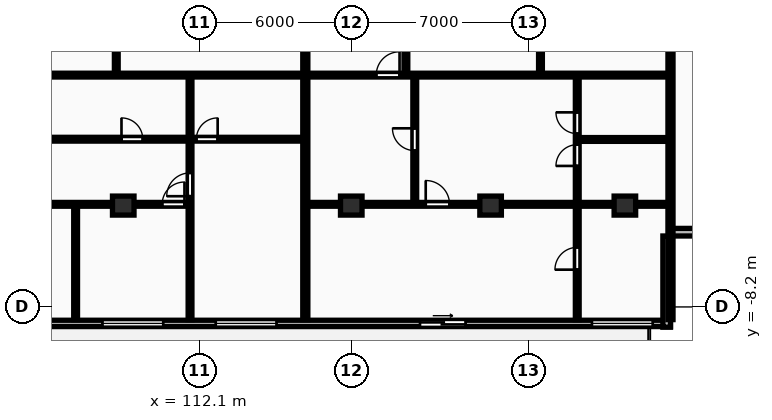
"""IFC4 building model, lengths in metres.
Left out: names, types, materials, properties, quantities, classifications, styles, units other than length and angle.
Written with IfcOpenShell. Run it as: python <this file> out.ifc"""

import sys

from ifc_helpers import new_model, si_unit, direction, frame, frame_2d, origin, origin_2d, place, context, subcontext, project, spatial, rectangle, extrude, element, fill, save


model = new_model("IFC4")
c1 = context("Model", 3, precision=1e-05, world=origin(), true_north=direction((0.0, 1.0)))
c2 = subcontext(c1, "Body", "Model", "MODEL_VIEW")
j1 = project(units=[si_unit("LENGTHUNIT", "METRE"), si_unit("PLANEANGLEUNIT", "RADIAN")], contexts=[c1])
p1 = place(None, origin())
s1 = spatial("IfcSite", under=j1, at=p1, CompositionType="ELEMENT")
p2 = place(p1, origin())
s2 = spatial("IfcBuilding", under=s1, at=p2, CompositionType="ELEMENT")
p3 = place(p2, frame((0.0, 0.0, 132.8)))
s3 = spatial("IfcBuildingStorey", under=s2, at=p3, CompositionType="ELEMENT", Elevation=132.8)
for number, where, z_axis, x_axis in (
    (1, (109.1, -4.2, 0.0), (0.0, 0.0, 1.0), (1.0, 0.0, 0.0)),
    (2, (118.1, -4.2, 0.0), (0.0, 0.0, 1.0), (1.0, 0.0, 0.0)),
    (3, (123.6, -4.2, 0.0), (0.0, 0.0, 1.0), (1.0, 0.0, 0.0)),
    (4, (128.9, -4.2, 0.0), (0.0, 0.0, 1.0), (1.0, 0.0, 0.0)),
):
    element("IfcColumn", number, at=place(p3, frame(where, z_axis=z_axis, x_axis=x_axis)), inside=s3, PredefinedType="COLUMN", context=c2, shape_type="SweptSolid", body=[
        extrude(rectangle(XDim=0.85, YDim=0.75, at=origin_2d()), origin(), (0.0, 0.0, 1.0), 3.25),
    ])
p4 = place(p3, frame((72.7, -8.85, 0.0), z_axis=(0.0, 0.0, 1.0), x_axis=(1.0, 0.0, 0.0)))
e5 = element("IfcWall", 5, at=p4, inside=s3, PredefinedType="STANDARD", context=c2, shape_type="SweptSolid", body=[
    extrude(rectangle(XDim=58.0, YDim=0.25, at=frame_2d((29.0, 0.0))), origin(), (0.0, 0.0, 1.0), 2.97),
])
p5 = place(p4, frame((6.19, 0.0, 0.85)))
e6 = element("IfcOpeningElement", 6, at=p5, cuts=e5, PredefinedType="OPENING", context=c2, shape_type="SweptSolid", body=[
    extrude(rectangle(XDim=2.4, YDim=1.9, at=frame_2d((1.2, 0.95))), frame((0.0, 0.135, 0.0), z_axis=(0.0, -1.0, 0.0), x_axis=(1.0, 0.0, 0.0)), (0.0, 0.0, 1.0), 0.27),
])
p6 = place(p4, frame((11.39, 0.0, 0.85)))
e7 = element("IfcOpeningElement", 7, at=p6, cuts=e5, PredefinedType="OPENING", context=c2, shape_type="SweptSolid", body=[
    extrude(rectangle(XDim=2.4, YDim=1.9, at=frame_2d((1.2, 0.95))), frame((0.0, 0.135, 0.0), z_axis=(0.0, -1.0, 0.0), x_axis=(1.0, 0.0, 0.0)), (0.0, 0.0, 1.0), 0.27),
])
p7 = place(p4, frame((16.535, 0.0, 0.85)))
e8 = element("IfcOpeningElement", 8, at=p7, cuts=e5, PredefinedType="OPENING", context=c2, shape_type="SweptSolid", body=[
    extrude(rectangle(XDim=2.4, YDim=1.9, at=frame_2d((1.2, 0.95))), frame((0.0, 0.135, 0.0), z_axis=(0.0, -1.0, 0.0), x_axis=(1.0, 0.0, 0.0)), (0.0, 0.0, 1.0), 0.27),
])
p8 = place(p4, frame((1.555, 0.0, 0.0)))
e9 = element("IfcOpeningElement", 9, at=p8, cuts=e5, PredefinedType="OPENING", context=c2, shape_type="SweptSolid", body=[
    extrude(rectangle(XDim=1.8, YDim=2.2, at=frame_2d((0.9, 1.1))), frame((0.0, 0.135, 0.0), z_axis=(0.0, -1.0, 0.0), x_axis=(1.0, 0.0, 0.0)), (0.0, 0.0, 1.0), 0.27),
])
p9 = place(p4, frame((21.357, 0.0, 0.85)))
e10 = element("IfcOpeningElement", 10, at=p9, cuts=e5, PredefinedType="OPENING", context=c2, shape_type="SweptSolid", body=[
    extrude(rectangle(XDim=2.4, YDim=1.9, at=frame_2d((1.2, 0.95))), frame((0.0, 0.135, 0.0), z_axis=(0.0, -1.0, 0.0), x_axis=(1.0, 0.0, 0.0)), (0.0, 0.0, 1.0), 0.27),
])
p10 = place(p4, frame((31.037, 0.0, 0.85)))
e11 = element("IfcOpeningElement", 11, at=p10, cuts=e5, PredefinedType="OPENING", context=c2, shape_type="SweptSolid", body=[
    extrude(rectangle(XDim=2.4, YDim=1.9, at=frame_2d((1.2, 0.95))), frame((0.0, 0.135, 0.0), z_axis=(0.0, -1.0, 0.0), x_axis=(1.0, 0.0, 0.0)), (0.0, 0.0, 1.0), 0.27),
])
p11 = place(p4, frame((35.578, 0.0, 0.85)))
e12 = element("IfcOpeningElement", 12, at=p11, cuts=e5, PredefinedType="OPENING", context=c2, shape_type="SweptSolid", body=[
    extrude(rectangle(XDim=2.4, YDim=1.9, at=frame_2d((1.2, 0.95))), frame((0.0, 0.135, 0.0), z_axis=(0.0, -1.0, 0.0), x_axis=(1.0, 0.0, 0.0)), (0.0, 0.0, 1.0), 0.27),
])
p12 = place(p4, frame((26.615, 0.0, 0.0)))
e13 = element("IfcOpeningElement", 13, at=p12, cuts=e5, PredefinedType="OPENING", context=c2, shape_type="SweptSolid", body=[
    extrude(rectangle(XDim=1.8, YDim=2.2, at=frame_2d((0.9, 1.1))), frame((0.0, 0.135, 0.0), z_axis=(0.0, -1.0, 0.0), x_axis=(1.0, 0.0, 0.0)), (0.0, 0.0, 1.0), 0.27),
])
p13 = place(p4, frame((40.051, 0.0, 0.85)))
e14 = element("IfcOpeningElement", 14, at=p13, cuts=e5, PredefinedType="OPENING", context=c2, shape_type="SweptSolid", body=[
    extrude(rectangle(XDim=2.4, YDim=1.9, at=frame_2d((1.2, 0.95))), frame((0.0, 0.135, 0.0), z_axis=(0.0, -1.0, 0.0), x_axis=(1.0, 0.0, 0.0)), (0.0, 0.0, 1.0), 0.27),
])
p14 = place(p4, frame((48.113, 0.0, 0.0)))
e15 = element("IfcOpeningElement", 15, at=p14, cuts=e5, PredefinedType="OPENING", context=c2, shape_type="SweptSolid", body=[
    extrude(rectangle(XDim=1.8, YDim=2.2, at=frame_2d((0.9, 1.1))), frame((0.0, 0.135, 0.0), z_axis=(0.0, -1.0, 0.0), x_axis=(1.0, 0.0, 0.0)), (0.0, 0.0, 1.0), 0.27),
])
p15 = place(p4, frame((54.9, 0.0, 0.85)))
e16 = element("IfcOpeningElement", 16, at=p15, cuts=e5, PredefinedType="OPENING", context=c2, shape_type="SweptSolid", body=[
    extrude(rectangle(XDim=2.4, YDim=1.9, at=frame_2d((1.2, 0.95))), frame((0.0, 0.135, 0.0), z_axis=(0.0, -1.0, 0.0), x_axis=(1.0, 0.0, 0.0)), (0.0, 0.0, 1.0), 0.27),
])
for number, where, z_axis, x_axis in (
    (17, (130.55, -9.0, 0.0), (0.0, 0.0, 1.0), (0.0, 1.0, 0.0)),
    (18, (130.7, -5.25, 0.0), (0.0, 0.0, 1.0), (1.0, 0.0, 0.0)),
):
    element("IfcWall", number, at=place(p3, frame(where, z_axis=z_axis, x_axis=x_axis)), inside=s3, PredefinedType="STANDARD", context=c2, shape_type="SweptSolid", body=[
        extrude(rectangle(XDim=3.6, YDim=0.3, at=frame_2d((1.8, 0.0))), origin(), (0.0, 0.0, 1.0), 2.97),
    ])
for number, where, z_axis, x_axis in (
    (19, (130.7, -8.7, 0.0), (0.0, 0.0, 1.0), (0.0, 1.0, 0.0)),
    (20, (116.286, -8.7, 0.0), (0.0, 0.0, 1.0), (0.0, 1.0, 0.0)),
):
    element("IfcWall", number, at=place(p3, frame(where, z_axis=z_axis, x_axis=x_axis)), inside=s3, PredefinedType="PARTITIONING", context=c2, shape_type="SweptSolid", body=[
        extrude(rectangle(XDim=24.57, YDim=0.2, at=frame_2d((12.285, 0.0))), origin(), (0.0, 0.0, 1.0), 2.97),
    ])
p16 = place(p3, frame((108.825, 0.99, 0.0), z_axis=(0.0, 0.0, 1.0), x_axis=(0.0, 1.0, 0.0)))
e21 = element("IfcWall", 21, at=p16, inside=s3, PredefinedType="PARTITIONING", context=c2, shape_type="SweptSolid", body=[
    extrude(rectangle(XDim=14.9, YDim=0.15, at=frame_2d((7.45, 0.0))), origin(), (0.0, 0.0, 1.0), 2.97),
])
p17 = place(p16, frame((3.321, 0.0, 0.0)))
e22 = element("IfcOpeningElement", 22, at=p17, cuts=e21, PredefinedType="OPENING", context=c2, shape_type="SweptSolid", body=[
    extrude(rectangle(XDim=0.84, YDim=2.04, at=frame_2d((0.42, 1.02))), frame((0.0, 0.085, 0.0), z_axis=(0.0, -1.0, 0.0), x_axis=(1.0, 0.0, 0.0)), (0.0, 0.0, 1.0), 0.17),
])
p18 = place(p16, frame((7.88, 0.0, 0.0)))
e23 = element("IfcOpeningElement", 23, at=p18, cuts=e21, PredefinedType="OPENING", context=c2, shape_type="SweptSolid", body=[
    extrude(rectangle(XDim=0.88, YDim=2.06, at=frame_2d((0.44, 1.03))), frame((0.0, 0.085, 0.0), z_axis=(0.0, -1.0, 0.0), x_axis=(1.0, 0.0, 0.0)), (0.0, 0.0, 1.0), 0.17),
])
p19 = place(p3, frame((107.22, -8.7, 0.0), z_axis=(0.0, 0.0, 1.0), x_axis=(0.0, 1.0, 0.0)))
e24 = element("IfcWall", 24, at=p19, inside=s3, PredefinedType="PARTITIONING", context=c2, shape_type="SweptSolid", body=[
    extrude(rectangle(XDim=4.47, YDim=0.15, at=frame_2d((2.235, 0.0))), origin(), (0.0, 0.0, 1.0), 2.97),
])
p20 = place(p3, frame((111.736, -1.56, 0.0), z_axis=(0.0, 0.0, 1.0), x_axis=(0.0, 1.0, 0.0)))
e25 = element("IfcWall", 25, at=p20, inside=s3, PredefinedType="PARTITIONING", context=c2, shape_type="SweptSolid", body=[
    extrude(rectangle(XDim=2.47, YDim=0.15, at=frame_2d((1.235, 0.0))), origin(), (0.0, 0.0, 1.0), 2.97),
])
p21 = place(p3, frame((111.736, -8.7, 0.0), z_axis=(0.0, 0.0, 1.0), x_axis=(0.0, 1.0, 0.0)))
e26 = element("IfcWall", 26, at=p21, inside=s3, PredefinedType="PARTITIONING", context=c2, shape_type="SweptSolid", body=[
    extrude(rectangle(XDim=7.1, YDim=0.15, at=frame_2d((3.55, 0.0))), origin(), (0.0, 0.0, 1.0), 2.97),
])
p22 = place(p21, frame((4.87, 0.0, 0.0)))
e27 = element("IfcOpeningElement", 27, at=p22, cuts=e26, PredefinedType="OPENING", context=c2, shape_type="SweptSolid", body=[
    extrude(rectangle(XDim=0.92, YDim=2.08, at=frame_2d((0.46, 1.04))), frame((0.0, 0.085, 0.0), z_axis=(0.0, -1.0, 0.0), x_axis=(1.0, 0.0, 0.0)), (0.0, 0.0, 1.0), 0.17),
])
p23 = place(p3, frame((102.695, -1.58, 0.0), z_axis=(0.0, 0.0, 1.0), x_axis=(1.0, 0.0, 0.0)))
e28 = element("IfcWall", 28, at=p23, inside=s3, PredefinedType="PARTITIONING", context=c2, shape_type="SweptSolid", body=[
    extrude(rectangle(XDim=13.512, YDim=0.15, at=frame_2d((6.756, 0.0))), origin(), (0.0, 0.0, 1.0), 2.97),
])
p24 = place(p23, frame((1.034, 0.0, 0.0)))
e29 = element("IfcOpeningElement", 29, at=p24, cuts=e28, PredefinedType="OPENING", context=c2, shape_type="SweptSolid", body=[
    extrude(rectangle(XDim=0.84, YDim=2.04, at=frame_2d((0.42, 1.02))), frame((0.0, 0.085, 0.0), z_axis=(0.0, -1.0, 0.0), x_axis=(1.0, 0.0, 0.0)), (0.0, 0.0, 1.0), 0.17),
])
p25 = place(p23, frame((6.336, 0.0, 0.0)))
e30 = element("IfcOpeningElement", 30, at=p25, cuts=e28, PredefinedType="OPENING", context=c2, shape_type="SweptSolid", body=[
    extrude(rectangle(XDim=0.84, YDim=2.04, at=frame_2d((0.42, 1.02))), frame((0.0, 0.085, 0.0), z_axis=(0.0, -1.0, 0.0), x_axis=(1.0, 0.0, 0.0)), (0.0, 0.0, 1.0), 0.17),
])
p26 = place(p23, frame((9.292, 0.0, 0.0)))
e31 = element("IfcOpeningElement", 31, at=p26, cuts=e28, PredefinedType="OPENING", context=c2, shape_type="SweptSolid", body=[
    extrude(rectangle(XDim=0.84, YDim=2.04, at=frame_2d((0.42, 1.02))), frame((0.0, 0.085, 0.0), z_axis=(0.0, -1.0, 0.0), x_axis=(1.0, 0.0, 0.0)), (0.0, 0.0, 1.0), 0.17),
])
p27 = place(p3, frame((97.735, 0.95, 0.0), z_axis=(0.0, 0.0, 1.0), x_axis=(1.0, 0.0, 0.0)))
e32 = element("IfcWall", 32, at=p27, inside=s3, PredefinedType="PARTITIONING", context=c2, shape_type="SweptSolid", body=[
    extrude(rectangle(XDim=18.472, YDim=0.15, at=frame_2d((9.236, 0.0))), origin(), (0.0, 0.0, 1.0), 2.97),
])
p28 = place(p27, frame((2.72, 0.0, 0.0)))
e33 = element("IfcOpeningElement", 33, at=p28, cuts=e32, PredefinedType="OPENING", context=c2, shape_type="SweptSolid", body=[
    extrude(rectangle(XDim=0.92, YDim=2.08, at=frame_2d((0.46, 1.04))), frame((0.0, 0.085, 0.0), z_axis=(0.0, -1.0, 0.0), x_axis=(1.0, 0.0, 0.0)), (0.0, 0.0, 1.0), 0.17),
])
p29 = place(p3, frame((97.735, -4.15, 0.0), z_axis=(0.0, 0.0, 1.0), x_axis=(1.0, 0.0, 0.0)))
e34 = element("IfcWall", 34, at=p29, inside=s3, PredefinedType="PARTITIONING", context=c2, shape_type="SweptSolid", body=[
    extrude(rectangle(XDim=14.002, YDim=0.15, at=frame_2d((7.001, 0.0))), origin(), (0.0, 0.0, 1.0), 2.663),
])
p30 = place(p29, frame((3.73, 0.0, 0.0)))
e35 = element("IfcOpeningElement", 35, at=p30, cuts=e34, PredefinedType="OPENING", context=c2, shape_type="SweptSolid", body=[
    extrude(rectangle(XDim=0.94, YDim=2.1, at=frame_2d((0.47, 1.05))), frame((0.0, 0.085, 0.0), z_axis=(0.0, -1.0, 0.0), x_axis=(1.0, 0.0, 0.0)), (0.0, 0.0, 1.0), 0.17),
])
p31 = place(p29, frame((6.561, 0.0, 0.0)))
e36 = element("IfcOpeningElement", 36, at=p31, cuts=e34, PredefinedType="OPENING", context=c2, shape_type="SweptSolid", body=[
    extrude(rectangle(XDim=0.88, YDim=2.06, at=frame_2d((0.44, 1.03))), frame((0.0, 0.085, 0.0), z_axis=(0.0, -1.0, 0.0), x_axis=(1.0, 0.0, 0.0)), (0.0, 0.0, 1.0), 0.17),
])
p32 = place(p29, frame((12.902, 0.0, 0.0)))
e37 = element("IfcOpeningElement", 37, at=p32, cuts=e34, PredefinedType="OPENING", context=c2, shape_type="SweptSolid", body=[
    extrude(rectangle(XDim=0.88, YDim=2.06, at=frame_2d((0.44, 1.03))), frame((0.0, 0.085, 0.0), z_axis=(0.0, -1.0, 0.0), x_axis=(1.0, 0.0, 0.0)), (0.0, 0.0, 1.0), 0.17),
])
p33 = place(p3, frame((125.568, 0.99, 0.0), z_axis=(0.0, 0.0, 1.0), x_axis=(0.0, 1.0, 0.0)))
e38 = element("IfcWall", 38, at=p33, inside=s3, PredefinedType="PARTITIONING", context=c2, shape_type="SweptSolid", body=[
    extrude(rectangle(XDim=7.27, YDim=0.15, at=frame_2d((3.635, 0.0))), origin(), (0.0, 0.0, 1.0), 2.97),
])
p34 = place(p33, frame((3.215, 0.0, 0.0)))
e39 = element("IfcOpeningElement", 39, at=p34, cuts=e38, PredefinedType="OPENING", context=c2, shape_type="SweptSolid", body=[
    extrude(rectangle(XDim=0.84, YDim=2.04, at=frame_2d((0.42, 1.02))), frame((0.0, 0.085, 0.0), z_axis=(0.0, -1.0, 0.0), x_axis=(1.0, 0.0, 0.0)), (0.0, 0.0, 1.0), 0.17),
])
p35 = place(p3, frame((120.256, 0.99, 0.0), z_axis=(0.0, 0.0, 1.0), x_axis=(0.0, 1.0, 0.0)))
e40 = element("IfcWall", 40, at=p35, inside=s3, PredefinedType="PARTITIONING", context=c2, shape_type="SweptSolid", body=[
    extrude(rectangle(XDim=14.9, YDim=0.15, at=frame_2d((7.45, 0.0))), origin(), (0.0, 0.0, 1.0), 2.97),
])
p36 = place(p35, frame((3.245, 0.0, 0.0)))
e41 = element("IfcOpeningElement", 41, at=p36, cuts=e40, PredefinedType="OPENING", context=c2, shape_type="SweptSolid", body=[
    extrude(rectangle(XDim=0.88, YDim=2.06, at=frame_2d((0.44, 1.03))), frame((0.0, 0.085, 0.0), z_axis=(0.0, -1.0, 0.0), x_axis=(1.0, 0.0, 0.0)), (0.0, 0.0, 1.0), 0.17),
])
p37 = place(p3, frame((120.606, -4.09, 0.0), z_axis=(0.0, 0.0, 1.0), x_axis=(0.0, 1.0, 0.0)))
e42 = element("IfcWall", 42, at=p37, inside=s3, PredefinedType="PARTITIONING", context=c2, shape_type="SweptSolid", body=[
    extrude(rectangle(XDim=5.0, YDim=0.15, at=frame_2d((2.5, 0.0))), origin(), (0.0, 0.0, 1.0), 2.97),
])
p38 = place(p37, frame((2.06, 0.0, 0.0)))
e43 = element("IfcOpeningElement", 43, at=p38, cuts=e42, PredefinedType="OPENING", context=c2, shape_type="SweptSolid", body=[
    extrude(rectangle(XDim=0.88, YDim=2.06, at=frame_2d((0.44, 1.03))), frame((0.0, 0.085, 0.0), z_axis=(0.0, -1.0, 0.0), x_axis=(1.0, 0.0, 0.0)), (0.0, 0.0, 1.0), 0.17),
])
p39 = place(p3, frame((127.08, -1.59, 0.0), z_axis=(0.0, 0.0, 1.0), x_axis=(1.0, 0.0, 0.0)))
e44 = element("IfcWall", 44, at=p39, inside=s3, PredefinedType="PARTITIONING", context=c2, shape_type="SweptSolid", body=[
    extrude(rectangle(XDim=3.54, YDim=0.15, at=frame_2d((1.77, 0.0))), origin(), (0.0, 0.0, 1.0), 2.97),
])
p40 = place(p3, frame((127.02, -8.7, 0.0), z_axis=(0.0, 0.0, 1.0), x_axis=(0.0, 1.0, 0.0)))
e45 = element("IfcWall", 45, at=p40, inside=s3, PredefinedType="PARTITIONING", context=c2, shape_type="SweptSolid", body=[
    extrude(rectangle(XDim=9.61, YDim=0.15, at=frame_2d((4.805, 0.0))), origin(), (0.0, 0.0, 1.0), 2.97),
])
p41 = place(p40, frame((6.065, 0.0, 0.0)))
e46 = element("IfcOpeningElement", 46, at=p41, cuts=e45, PredefinedType="OPENING", context=c2, shape_type="SweptSolid", body=[
    extrude(rectangle(XDim=0.84, YDim=2.04, at=frame_2d((0.42, 1.02))), frame((0.0, 0.085, 0.0), z_axis=(0.0, -1.0, 0.0), x_axis=(1.0, 0.0, 0.0)), (0.0, 0.0, 1.0), 0.17),
])
p42 = place(p40, frame((7.34, 0.0, 0.0)))
e47 = element("IfcOpeningElement", 47, at=p42, cuts=e45, PredefinedType="OPENING", context=c2, shape_type="SweptSolid", body=[
    extrude(rectangle(XDim=0.84, YDim=2.04, at=frame_2d((0.42, 1.02))), frame((0.0, 0.085, 0.0), z_axis=(0.0, -1.0, 0.0), x_axis=(1.0, 0.0, 0.0)), (0.0, 0.0, 1.0), 0.17),
])
p43 = place(p40, frame((1.971, 0.0, 0.0)))
e48 = element("IfcOpeningElement", 48, at=p43, cuts=e45, PredefinedType="OPENING", context=c2, shape_type="SweptSolid", body=[
    extrude(rectangle(XDim=0.88, YDim=2.06, at=frame_2d((0.44, 1.03))), frame((0.0, 0.085, 0.0), z_axis=(0.0, -1.0, 0.0), x_axis=(1.0, 0.0, 0.0)), (0.0, 0.0, 1.0), 0.17),
])
p44 = place(p3, frame((116.366, 0.95, 0.0), z_axis=(0.0, 0.0, 1.0), x_axis=(1.0, 0.0, 0.0)))
e49 = element("IfcWall", 49, at=p44, inside=s3, PredefinedType="PARTITIONING", context=c2, shape_type="SweptSolid", body=[
    extrude(rectangle(XDim=14.254, YDim=0.15, at=frame_2d((7.127, 0.0))), origin(), (0.0, 0.0, 1.0), 2.97),
])
p45 = place(p44, frame((2.72, 0.0, 0.0)))
e50 = element("IfcOpeningElement", 50, at=p45, cuts=e49, PredefinedType="OPENING", context=c2, shape_type="SweptSolid", body=[
    extrude(rectangle(XDim=0.92, YDim=2.08, at=frame_2d((0.46, 1.04))), frame((0.0, 0.085, 0.0), z_axis=(0.0, -1.0, 0.0), x_axis=(1.0, 0.0, 0.0)), (0.0, 0.0, 1.0), 0.17),
])
p46 = place(p3, frame((116.366, -4.15, 0.0), z_axis=(0.0, 0.0, 1.0), x_axis=(1.0, 0.0, 0.0)))
e51 = element("IfcWall", 51, at=p46, inside=s3, PredefinedType="PARTITIONING", context=c2, shape_type="SweptSolid", body=[
    extrude(rectangle(XDim=14.254, YDim=0.15, at=frame_2d((7.127, 0.0))), origin(), (0.0, 0.0, 1.0), 2.663),
])
p47 = place(p46, frame((4.673, 0.0, 0.0)))
e52 = element("IfcOpeningElement", 52, at=p47, cuts=e51, PredefinedType="OPENING", context=c2, shape_type="SweptSolid", body=[
    extrude(rectangle(XDim=0.94, YDim=2.1, at=frame_2d((0.47, 1.05))), frame((0.0, 0.085, 0.0), z_axis=(0.0, -1.0, 0.0), x_axis=(1.0, 0.0, 0.0)), (0.0, 0.0, 1.0), 0.17),
])
p48 = place(p11, origin())
e53 = element("IfcWindow", 53, at=p48, inside=s3, PartitioningType="DOUBLE_PANEL_VERTICAL", PredefinedType="WINDOW", context=c2, shape_type="SweptSolid", body=[
    extrude(rectangle(XDim=2.4, YDim=1.9, at=frame_2d((1.2, 0.95))), frame((0.0, 0.03, 0.0), z_axis=(0.0, -1.0, 0.0), x_axis=(1.0, 0.0, 0.0)), (0.0, 0.0, 1.0), 0.06),
])
fill(e12, e53)
p49 = place(p13, origin())
e54 = element("IfcWindow", 54, at=p49, inside=s3, PartitioningType="DOUBLE_PANEL_VERTICAL", PredefinedType="WINDOW", context=c2, shape_type="SweptSolid", body=[
    extrude(rectangle(XDim=2.4, YDim=1.9, at=frame_2d((1.2, 0.95))), frame((0.0, 0.03, 0.0), z_axis=(0.0, -1.0, 0.0), x_axis=(1.0, 0.0, 0.0)), (0.0, 0.0, 1.0), 0.06),
])
fill(e14, e54)
p50 = place(p14, origin())
e55 = element("IfcDoor", 55, at=p50, inside=s3, OperationType="SLIDING_TO_RIGHT", PredefinedType="DOOR", context=c2, shape_type="SweptSolid", body=[
    extrude(rectangle(XDim=1.8, YDim=2.2, at=frame_2d((0.9, 1.1))), frame((0.0, 0.025, 0.0), z_axis=(0.0, -1.0, 0.0), x_axis=(1.0, 0.0, 0.0)), (0.0, 0.0, 1.0), 0.05),
])
fill(e15, e55)
p51 = place(p15, origin())
e56 = element("IfcWindow", 56, at=p51, inside=s3, PartitioningType="DOUBLE_PANEL_VERTICAL", PredefinedType="WINDOW", context=c2, shape_type="SweptSolid", body=[
    extrude(rectangle(XDim=2.4, YDim=1.9, at=frame_2d((1.2, 0.95))), frame((0.0, 0.03, 0.0), z_axis=(0.0, -1.0, 0.0), x_axis=(1.0, 0.0, 0.0)), (0.0, 0.0, 1.0), 0.06),
])
fill(e16, e56)
p52 = place(p22, origin())
e57 = element("IfcDoor", 57, at=p52, inside=s3, OperationType="SINGLE_SWING_LEFT", PredefinedType="DOOR", context=c2, shape_type="SweptSolid", body=[
    extrude(rectangle(XDim=0.92, YDim=2.08, at=frame_2d((0.46, 1.04))), frame((0.0, 0.025, 0.0), z_axis=(0.0, -1.0, 0.0), x_axis=(1.0, 0.0, 0.0)), (0.0, 0.0, 1.0), 0.05),
])
fill(e27, e57)
p53 = place(p25, origin())
e58 = element("IfcDoor", 58, at=p53, inside=s3, OperationType="SINGLE_SWING_LEFT", PredefinedType="DOOR", context=c2, shape_type="SweptSolid", body=[
    extrude(rectangle(XDim=0.84, YDim=2.04, at=frame_2d((0.42, 1.02))), frame((0.0, 0.025, 0.0), z_axis=(0.0, -1.0, 0.0), x_axis=(1.0, 0.0, 0.0)), (0.0, 0.0, 1.0), 0.05),
])
fill(e30, e58)
p54 = place(p26, origin())
e59 = element("IfcDoor", 59, at=p54, inside=s3, OperationType="SINGLE_SWING_RIGHT", PredefinedType="DOOR", context=c2, shape_type="SweptSolid", body=[
    extrude(rectangle(XDim=0.84, YDim=2.04, at=frame_2d((0.42, 1.02))), frame((0.0, 0.025, 0.0), z_axis=(0.0, -1.0, 0.0), x_axis=(1.0, 0.0, 0.0)), (0.0, 0.0, 1.0), 0.05),
])
fill(e31, e59)
p55 = place(p32, origin())
e60 = element("IfcDoor", 60, at=p55, inside=s3, OperationType="SINGLE_SWING_RIGHT", PredefinedType="DOOR", context=c2, shape_type="SweptSolid", body=[
    extrude(rectangle(XDim=0.88, YDim=2.06, at=frame_2d((0.44, 1.03))), frame((0.0, 0.025, 0.0), z_axis=(0.0, -1.0, 0.0), x_axis=(1.0, 0.0, 0.0)), (0.0, 0.0, 1.0), 0.05),
])
fill(e37, e60)
p56 = place(p38, origin())
e61 = element("IfcDoor", 61, at=p56, inside=s3, OperationType="SINGLE_SWING_RIGHT", PredefinedType="DOOR", context=c2, shape_type="SweptSolid", body=[
    extrude(rectangle(XDim=0.88, YDim=2.06, at=frame_2d((0.44, 1.03))), frame((0.0, 0.025, 0.0), z_axis=(0.0, -1.0, 0.0), x_axis=(1.0, 0.0, 0.0)), (0.0, 0.0, 1.0), 0.05),
])
fill(e43, e61)
p57 = place(p41, origin())
e62 = element("IfcDoor", 62, at=p57, inside=s3, OperationType="SINGLE_SWING_LEFT", PredefinedType="DOOR", context=c2, shape_type="SweptSolid", body=[
    extrude(rectangle(XDim=0.84, YDim=2.04, at=frame_2d((0.42, 1.02))), frame((0.0, 0.025, 0.0), z_axis=(0.0, -1.0, 0.0), x_axis=(1.0, 0.0, 0.0)), (0.0, 0.0, 1.0), 0.05),
])
fill(e46, e62)
p58 = place(p42, origin())
e63 = element("IfcDoor", 63, at=p58, inside=s3, OperationType="SINGLE_SWING_RIGHT", PredefinedType="DOOR", context=c2, shape_type="SweptSolid", body=[
    extrude(rectangle(XDim=0.84, YDim=2.04, at=frame_2d((0.42, 1.02))), frame((0.0, 0.025, 0.0), z_axis=(0.0, -1.0, 0.0), x_axis=(1.0, 0.0, 0.0)), (0.0, 0.0, 1.0), 0.05),
])
fill(e47, e63)
p59 = place(p43, origin())
e64 = element("IfcDoor", 64, at=p59, inside=s3, OperationType="SINGLE_SWING_LEFT", PredefinedType="DOOR", context=c2, shape_type="SweptSolid", body=[
    extrude(rectangle(XDim=0.88, YDim=2.06, at=frame_2d((0.44, 1.03))), frame((0.0, 0.025, 0.0), z_axis=(0.0, -1.0, 0.0), x_axis=(1.0, 0.0, 0.0)), (0.0, 0.0, 1.0), 0.05),
])
fill(e48, e64)
p60 = place(p45, origin())
e65 = element("IfcDoor", 65, at=p60, inside=s3, OperationType="SINGLE_SWING_RIGHT", PredefinedType="DOOR", context=c2, shape_type="SweptSolid", body=[
    extrude(rectangle(XDim=0.92, YDim=2.08, at=frame_2d((0.46, 1.04))), frame((0.0, 0.025, 0.0), z_axis=(0.0, -1.0, 0.0), x_axis=(1.0, 0.0, 0.0)), (0.0, 0.0, 1.0), 0.05),
])
fill(e50, e65)
p61 = place(p47, origin())
e66 = element("IfcDoor", 66, at=p61, inside=s3, OperationType="SINGLE_SWING_LEFT", PredefinedType="DOOR", context=c2, shape_type="SweptSolid", body=[
    extrude(rectangle(XDim=0.94, YDim=2.1, at=frame_2d((0.47, 1.05))), frame((0.0, 0.025, 0.0), z_axis=(0.0, -1.0, 0.0), x_axis=(1.0, 0.0, 0.0)), (0.0, 0.0, 1.0), 0.05),
])
fill(e52, e66)
save(model, sys.argv[1])
